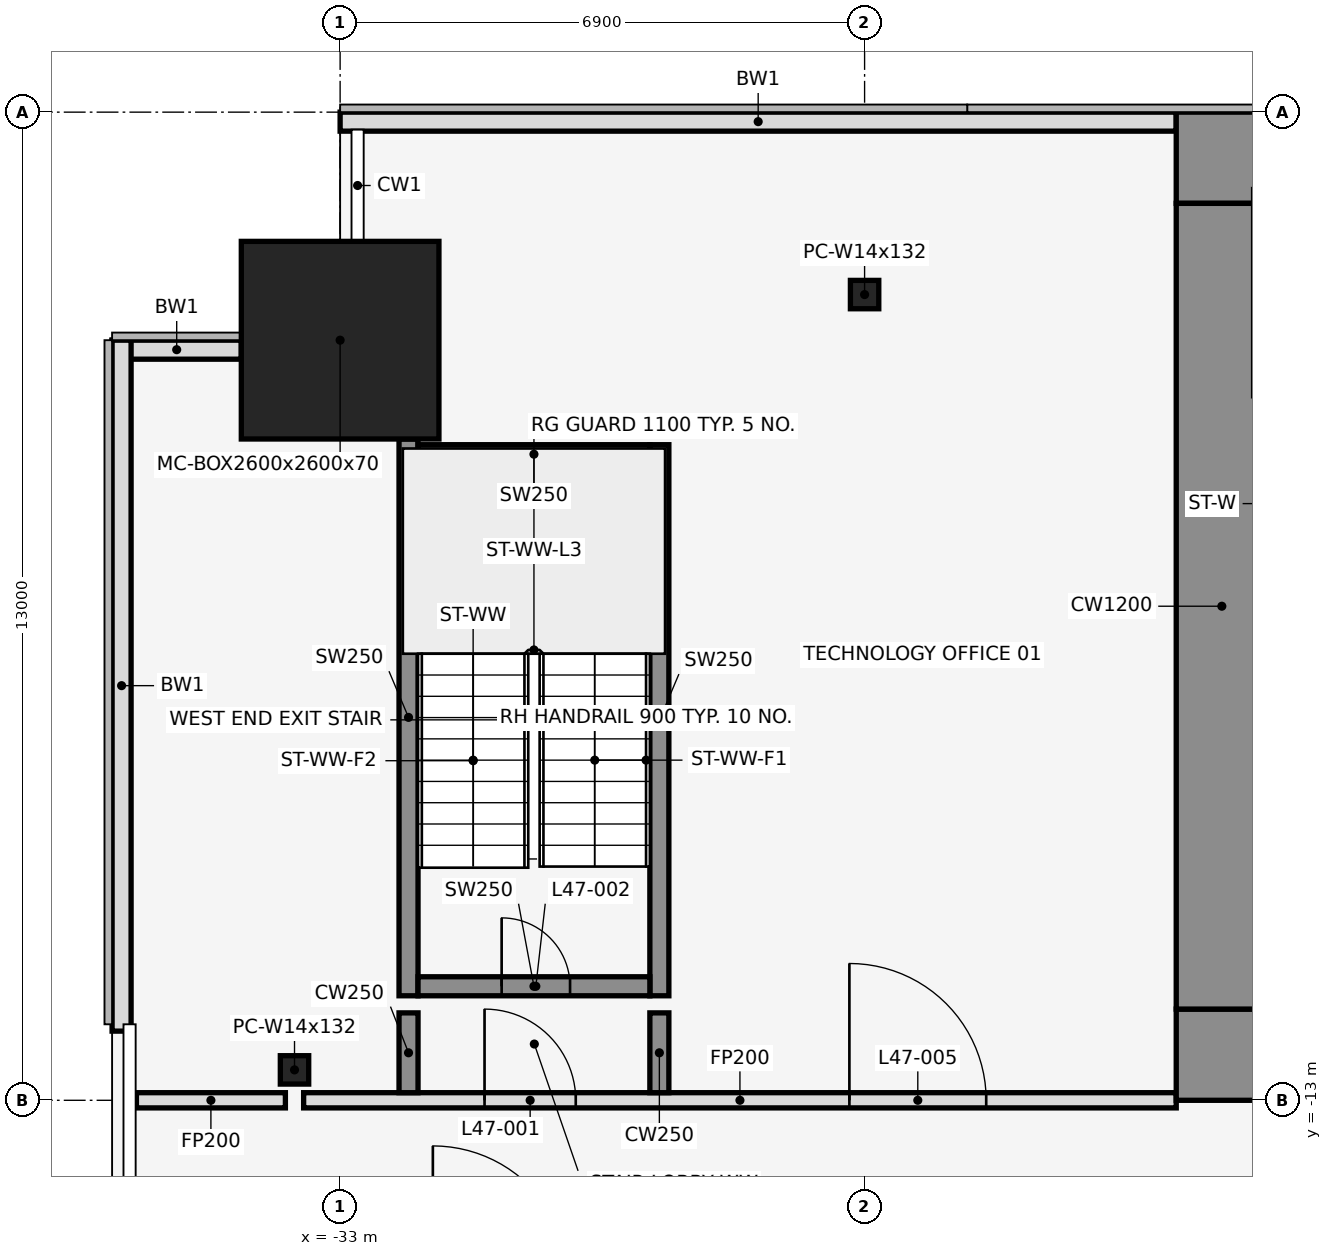
"""IFC4 building model, lengths in metres.
Left out: names, types, materials, properties, quantities, classifications, styles, units other than length and angle.
Written with IfcOpenShell. Run it as: python <this file> out.ifc"""

import sys

from ifc_helpers import new_model, si_unit, direction, frame, frame_2d, origin, origin_2d, place, context, subcontext, project, spatial, rectangle, hollow_rectangle, i_section, extrude, element, fill, save


model = new_model("IFC4")
c1 = context("Model", 3, precision=1e-05, world=origin(), true_north=direction((0.0, 1.0)))
c2 = subcontext(c1, "Body", "Model", "MODEL_VIEW")
j1 = project(units=[si_unit("LENGTHUNIT", "METRE"), si_unit("PLANEANGLEUNIT", "RADIAN")], contexts=[c1])
p1 = place(None, origin())
s1 = spatial("IfcSite", under=j1, at=p1, CompositionType="ELEMENT")
p2 = place(p1, origin())
s2 = spatial("IfcBuilding", under=s1, at=p2, CompositionType="ELEMENT")
p3 = place(p2, frame((0.0, 0.0, 211.4)))
s3 = spatial("IfcBuildingStorey", under=s2, at=p3, CompositionType="ELEMENT", Elevation=211.4)
p4 = place(p3, frame((-33.0, -3.0, 0.0), z_axis=(0.0, 0.0, 1.0), x_axis=(1.0, 0.0, 0.0)))
e1 = element("IfcColumn", 1, at=p4, inside=s3, PredefinedType="COLUMN", context=c2, shape_type="SweptSolid", body=[
    extrude(hollow_rectangle(XDim=2.6, YDim=2.6, WallThickness=0.07, at=origin_2d()), origin(), (0.0, 0.0, 1.0), 4.1),
])
for number, where, z_axis, x_axis in (
    (2, (-26.1, -2.4, 0.0), (0.0, 0.0, 1.0), (1.0, 0.0, 0.0)),
    (3, (-33.6, -12.6, 0.0), (0.0, 0.0, 1.0), (1.0, 0.0, 0.0)),
):
    element("IfcColumn", number, at=place(p3, frame(where, z_axis=z_axis, x_axis=x_axis)), inside=s3, PredefinedType="COLUMN", context=c2, shape_type="SweptSolid", body=[
        extrude(i_section(OverallWidth=0.373, OverallDepth=0.373, WebThickness=0.016, FlangeThickness=0.026, at=origin_2d()), origin(), (0.0, 0.0, 1.0), 4.1),
    ])
p5 = place(p3, frame((-22.0, -0.125, 0.0), z_axis=(0.0, 0.0, 1.0), x_axis=(-1.0, 0.0, 0.0)))
e4 = element("IfcWall", 4, at=p5, inside=s3, PredefinedType="STANDARD", context=c2, shape_type="SweptSolid", body=[
    extrude(rectangle(XDim=11.0, YDim=0.25, at=frame_2d((5.5, 0.0))), origin(), (0.0, 0.0, 1.0), 3.95),
])
p6 = place(p3, frame((-34.3, -3.125, 0.0), z_axis=(0.0, 0.0, 1.0), x_axis=(-1.0, 0.0, 0.0)))
e5 = element("IfcWall", 5, at=p6, inside=s3, PredefinedType="STANDARD", context=c2, shape_type="SweptSolid", body=[
    extrude(rectangle(XDim=1.7, YDim=0.25, at=frame_2d((0.85, 0.0))), origin(), (0.0, 0.0, 1.0), 3.95),
])
p7 = place(p3, frame((-35.875, -3.0, 0.0), z_axis=(0.0, 0.0, 1.0), x_axis=(0.0, -1.0, 0.0)))
e6 = element("IfcWall", 6, at=p7, inside=s3, PredefinedType="STANDARD", context=c2, shape_type="SweptSolid", body=[
    extrude(rectangle(XDim=9.09, YDim=0.25, at=frame_2d((4.545, 0.0))), origin(), (0.0, 0.0, 1.0), 3.95),
])
p8 = place(p3, frame((-32.1, -11.625, 0.0), z_axis=(0.0, 0.0, 1.0), x_axis=(0.0, 1.0, 0.0)))
e7 = element("IfcWall", 7, at=p8, inside=s3, PredefinedType="SHEAR", context=c2, shape_type="SweptSolid", body=[
    extrude(rectangle(XDim=7.325, YDim=0.25, at=frame_2d((3.663, 0.0))), origin(), (0.0, 0.0, 1.0), 4.1),
])
p9 = place(p3, frame((-28.8, -11.625, 0.0), z_axis=(0.0, 0.0, 1.0), x_axis=(0.0, 1.0, 0.0)))
e8 = element("IfcWall", 8, at=p9, inside=s3, PredefinedType="SHEAR", context=c2, shape_type="SweptSolid", body=[
    extrude(rectangle(XDim=7.25, YDim=0.25, at=frame_2d((3.625, 0.0))), origin(), (0.0, 0.0, 1.0), 4.1),
])
p10 = place(p3, frame((-31.975, -11.5, 0.0), z_axis=(0.0, 0.0, 1.0), x_axis=(1.0, 0.0, 0.0)))
e9 = element("IfcWall", 9, at=p10, inside=s3, PredefinedType="SHEAR", context=c2, shape_type="SweptSolid", body=[
    extrude(rectangle(XDim=3.05, YDim=0.25, at=frame_2d((1.525, 0.0))), origin(), (0.0, 0.0, 1.0), 4.1),
])
p11 = place(p10, frame((1.1, 0.0, 0.0)))
e10 = element("IfcOpeningElement", 10, at=p11, cuts=e9, PredefinedType="OPENING", context=c2, shape_type="SweptSolid", body=[
    extrude(rectangle(XDim=0.9, YDim=2.1, at=frame_2d((0.45, 1.05))), frame((0.0, 0.137, 0.0), z_axis=(0.0, -1.0, 0.0), x_axis=(1.0, 0.0, 0.0)), (0.0, 0.0, 1.0), 0.274),
])
p12 = place(p3, frame((-31.975, -4.5, 0.0), z_axis=(0.0, 0.0, 1.0), x_axis=(1.0, 0.0, 0.0)))
e11 = element("IfcWall", 11, at=p12, inside=s3, PredefinedType="SHEAR", context=c2, shape_type="SweptSolid", body=[
    extrude(rectangle(XDim=3.05, YDim=0.25, at=frame_2d((1.525, 0.0))), origin(), (0.0, 0.0, 1.0), 4.1),
])
p13 = place(p3, frame((-35.68, -13.0, 0.0), z_axis=(0.0, 0.0, 1.0), x_axis=(1.0, 0.0, 0.0)))
e12 = element("IfcWall", 12, at=p13, inside=s3, PredefinedType="PARTITIONING", context=c2, shape_type="SweptSolid", body=[
    extrude(rectangle(XDim=1.96, YDim=0.2, at=frame_2d((0.98, 0.0))), origin(), (0.0, 0.0, 1.0), 2.841),
])
p14 = place(p3, frame((-33.48, -13.0, 0.0), z_axis=(0.0, 0.0, 1.0), x_axis=(1.0, 0.0, 0.0)))
e13 = element("IfcWall", 13, at=p14, inside=s3, PredefinedType="PARTITIONING", context=c2, shape_type="SweptSolid", body=[
    extrude(rectangle(XDim=11.48, YDim=0.2, at=frame_2d((5.74, 0.0))), origin(), (0.0, 0.0, 1.0), 2.841),
])
p15 = place(p14, frame((2.38, 0.0, 0.0)))
e14 = element("IfcOpeningElement", 14, at=p15, cuts=e13, PredefinedType="OPENING", context=c2, shape_type="SweptSolid", body=[
    extrude(rectangle(XDim=1.2, YDim=2.1, at=frame_2d((0.6, 1.05))), frame((0.0, 0.112, 0.0), z_axis=(0.0, -1.0, 0.0), x_axis=(1.0, 0.0, 0.0)), (0.0, 0.0, 1.0), 0.224),
])
p16 = place(p14, frame((7.18, 0.0, 0.0)))
e15 = element("IfcOpeningElement", 15, at=p16, cuts=e13, PredefinedType="OPENING", context=c2, shape_type="SweptSolid", body=[
    extrude(rectangle(XDim=1.8, YDim=2.1, at=frame_2d((0.9, 1.05))), frame((0.0, 0.112, 0.0), z_axis=(0.0, -1.0, 0.0), x_axis=(1.0, 0.0, 0.0)), (0.0, 0.0, 1.0), 0.224),
])
for number, where, z_axis, x_axis in (
    (16, (-32.1, -12.9, 0.0), (0.0, 0.0, 1.0), (0.0, 1.0, 0.0)),
    (17, (-28.8, -12.9, 0.0), (0.0, 0.0, 1.0), (0.0, 1.0, 0.0)),
):
    element("IfcWall", number, at=place(p3, frame(where, z_axis=z_axis, x_axis=x_axis)), inside=s3, PredefinedType="SHEAR", context=c2, shape_type="SweptSolid", body=[
        extrude(rectangle(XDim=1.05, YDim=0.25, at=frame_2d((0.525, 0.0))), origin(), (0.0, 0.0, 1.0), 4.1),
    ])
p17 = place(p3, frame((-22.0, -0.6, 0.0), z_axis=(0.0, 0.0, 1.0), x_axis=(1.0, 0.0, 0.0)))
e18 = element("IfcWall", 18, at=p17, inside=s3, PredefinedType="SHEAR", context=c2, shape_type="SweptSolid", body=[
    extrude(rectangle(XDim=44.0, YDim=1.2, at=frame_2d((22.0, 0.0))), origin(), (0.0, 0.0, 1.0), 4.1),
])
p18 = place(p17, frame((18.55, 0.0, 0.0)))
e19 = element("IfcOpeningElement", 19, at=p18, cuts=e18, PredefinedType="OPENING", context=c2, shape_type="SweptSolid", body=[
    extrude(rectangle(XDim=0.9, YDim=2.1, at=frame_2d((0.45, 1.05))), frame((0.0, 0.612, 0.0), z_axis=(0.0, -1.0, 0.0), x_axis=(1.0, 0.0, 0.0)), (0.0, 0.0, 1.0), 1.224),
])
p19 = place(p17, frame((24.55, 0.0, 0.0)))
e20 = element("IfcOpeningElement", 20, at=p19, cuts=e18, PredefinedType="OPENING", context=c2, shape_type="SweptSolid", body=[
    extrude(rectangle(XDim=0.9, YDim=2.1, at=frame_2d((0.45, 1.05))), frame((0.0, 0.612, 0.0), z_axis=(0.0, -1.0, 0.0), x_axis=(1.0, 0.0, 0.0)), (0.0, 0.0, 1.0), 1.224),
])
p20 = place(p3, frame((-22.0, -12.4, 0.0), z_axis=(0.0, 0.0, 1.0), x_axis=(1.0, 0.0, 0.0)))
e21 = element("IfcWall", 21, at=p20, inside=s3, PredefinedType="SHEAR", context=c2, shape_type="SweptSolid", body=[
    extrude(rectangle(XDim=44.0, YDim=1.2, at=frame_2d((22.0, 0.0))), origin(), (0.0, 0.0, 1.0), 4.1),
])
p21 = place(p20, frame((2.2, 0.0, 0.0)))
e22 = element("IfcOpeningElement", 22, at=p21, cuts=e21, PredefinedType="OPENING", context=c2, shape_type="SweptSolid", body=[
    extrude(rectangle(XDim=1.2, YDim=2.1, at=frame_2d((0.6, 1.05))), frame((0.0, 0.612, 0.0), z_axis=(0.0, -1.0, 0.0), x_axis=(1.0, 0.0, 0.0)), (0.0, 0.0, 1.0), 1.224),
])
p22 = place(p20, frame((21.4, 0.0, 0.0)))
e23 = element("IfcOpeningElement", 23, at=p22, cuts=e21, PredefinedType="OPENING", context=c2, shape_type="SweptSolid", body=[
    extrude(rectangle(XDim=1.2, YDim=2.1, at=frame_2d((0.6, 1.05))), frame((0.0, 0.612, 0.0), z_axis=(0.0, -1.0, 0.0), x_axis=(1.0, 0.0, 0.0)), (0.0, 0.0, 1.0), 1.224),
])
p23 = place(p20, frame((40.6, 0.0, 0.0)))
e24 = element("IfcOpeningElement", 24, at=p23, cuts=e21, PredefinedType="OPENING", context=c2, shape_type="SweptSolid", body=[
    extrude(rectangle(XDim=1.2, YDim=2.1, at=frame_2d((0.6, 1.05))), frame((0.0, 0.612, 0.0), z_axis=(0.0, -1.0, 0.0), x_axis=(1.0, 0.0, 0.0)), (0.0, 0.0, 1.0), 1.224),
])
p24 = place(p20, frame((16.0, 0.0, 0.0)))
e25 = element("IfcOpeningElement", 25, at=p24, cuts=e21, PredefinedType="OPENING", context=c2, shape_type="SweptSolid", body=[
    extrude(rectangle(XDim=1.8, YDim=2.1, at=frame_2d((0.9, 1.05))), frame((0.0, 0.612, 0.0), z_axis=(0.0, -1.0, 0.0), x_axis=(1.0, 0.0, 0.0)), (0.0, 0.0, 1.0), 1.224),
])
p25 = place(p20, frame((6.3, 0.0, 0.0)))
e26 = element("IfcOpeningElement", 26, at=p25, cuts=e21, PredefinedType="OPENING", context=c2, shape_type="SweptSolid", body=[
    extrude(rectangle(XDim=1.2, YDim=2.1, at=frame_2d((0.6, 1.05))), frame((0.0, 0.612, 0.0), z_axis=(0.0, -1.0, 0.0), x_axis=(1.0, 0.0, 0.0)), (0.0, 0.0, 1.0), 1.224),
])
p26 = place(p20, frame((26.2, 0.0, 0.0)))
e27 = element("IfcOpeningElement", 27, at=p26, cuts=e21, PredefinedType="OPENING", context=c2, shape_type="SweptSolid", body=[
    extrude(rectangle(XDim=1.8, YDim=2.1, at=frame_2d((0.9, 1.05))), frame((0.0, 0.612, 0.0), z_axis=(0.0, -1.0, 0.0), x_axis=(1.0, 0.0, 0.0)), (0.0, 0.0, 1.0), 1.224),
])
p27 = place(p20, frame((36.5, 0.0, 0.0)))
e28 = element("IfcOpeningElement", 28, at=p27, cuts=e21, PredefinedType="OPENING", context=c2, shape_type="SweptSolid", body=[
    extrude(rectangle(XDim=1.2, YDim=2.1, at=frame_2d((0.6, 1.05))), frame((0.0, 0.612, 0.0), z_axis=(0.0, -1.0, 0.0), x_axis=(1.0, 0.0, 0.0)), (0.0, 0.0, 1.0), 1.224),
])
p28 = place(p3, frame((-21.4, -11.8, 0.0), z_axis=(0.0, 0.0, 1.0), x_axis=(0.0, 1.0, 0.0)))
e29 = element("IfcWall", 29, at=p28, inside=s3, PredefinedType="SHEAR", context=c2, shape_type="SweptSolid", body=[
    extrude(rectangle(XDim=10.6, YDim=1.2, at=frame_2d((5.3, 0.0))), origin(), (0.0, 0.0, 1.0), 4.1),
])
p29 = place(p15, origin())
e30 = element("IfcDoor", 30, at=p29, inside=s3, OperationType="SINGLE_SWING_LEFT", PredefinedType="DOOR", context=c2, shape_type="SweptSolid", body=[
    extrude(rectangle(XDim=1.2, YDim=2.1, at=frame_2d((0.6, 1.05))), frame((0.0, 0.025, 0.0), z_axis=(0.0, -1.0, 0.0), x_axis=(1.0, 0.0, 0.0)), (0.0, 0.0, 1.0), 0.05),
])
fill(e14, e30)
p30 = place(p11, origin())
e31 = element("IfcDoor", 31, at=p30, inside=s3, OperationType="SINGLE_SWING_LEFT", PredefinedType="DOOR", context=c2, shape_type="SweptSolid", body=[
    extrude(rectangle(XDim=0.9, YDim=2.1, at=frame_2d((0.45, 1.05))), frame((0.0, 0.025, 0.0), z_axis=(0.0, -1.0, 0.0), x_axis=(1.0, 0.0, 0.0)), (0.0, 0.0, 1.0), 0.05),
])
fill(e10, e31)
p31 = place(p16, origin())
e32 = element("IfcDoor", 32, at=p31, inside=s3, OperationType="SINGLE_SWING_LEFT", PredefinedType="DOOR", context=c2, shape_type="SweptSolid", body=[
    extrude(rectangle(XDim=1.8, YDim=2.1, at=frame_2d((0.9, 1.05))), frame((0.0, 0.025, 0.0), z_axis=(0.0, -1.0, 0.0), x_axis=(1.0, 0.0, 0.0)), (0.0, 0.0, 1.0), 0.05),
])
fill(e15, e32)
save(model, sys.argv[1])
